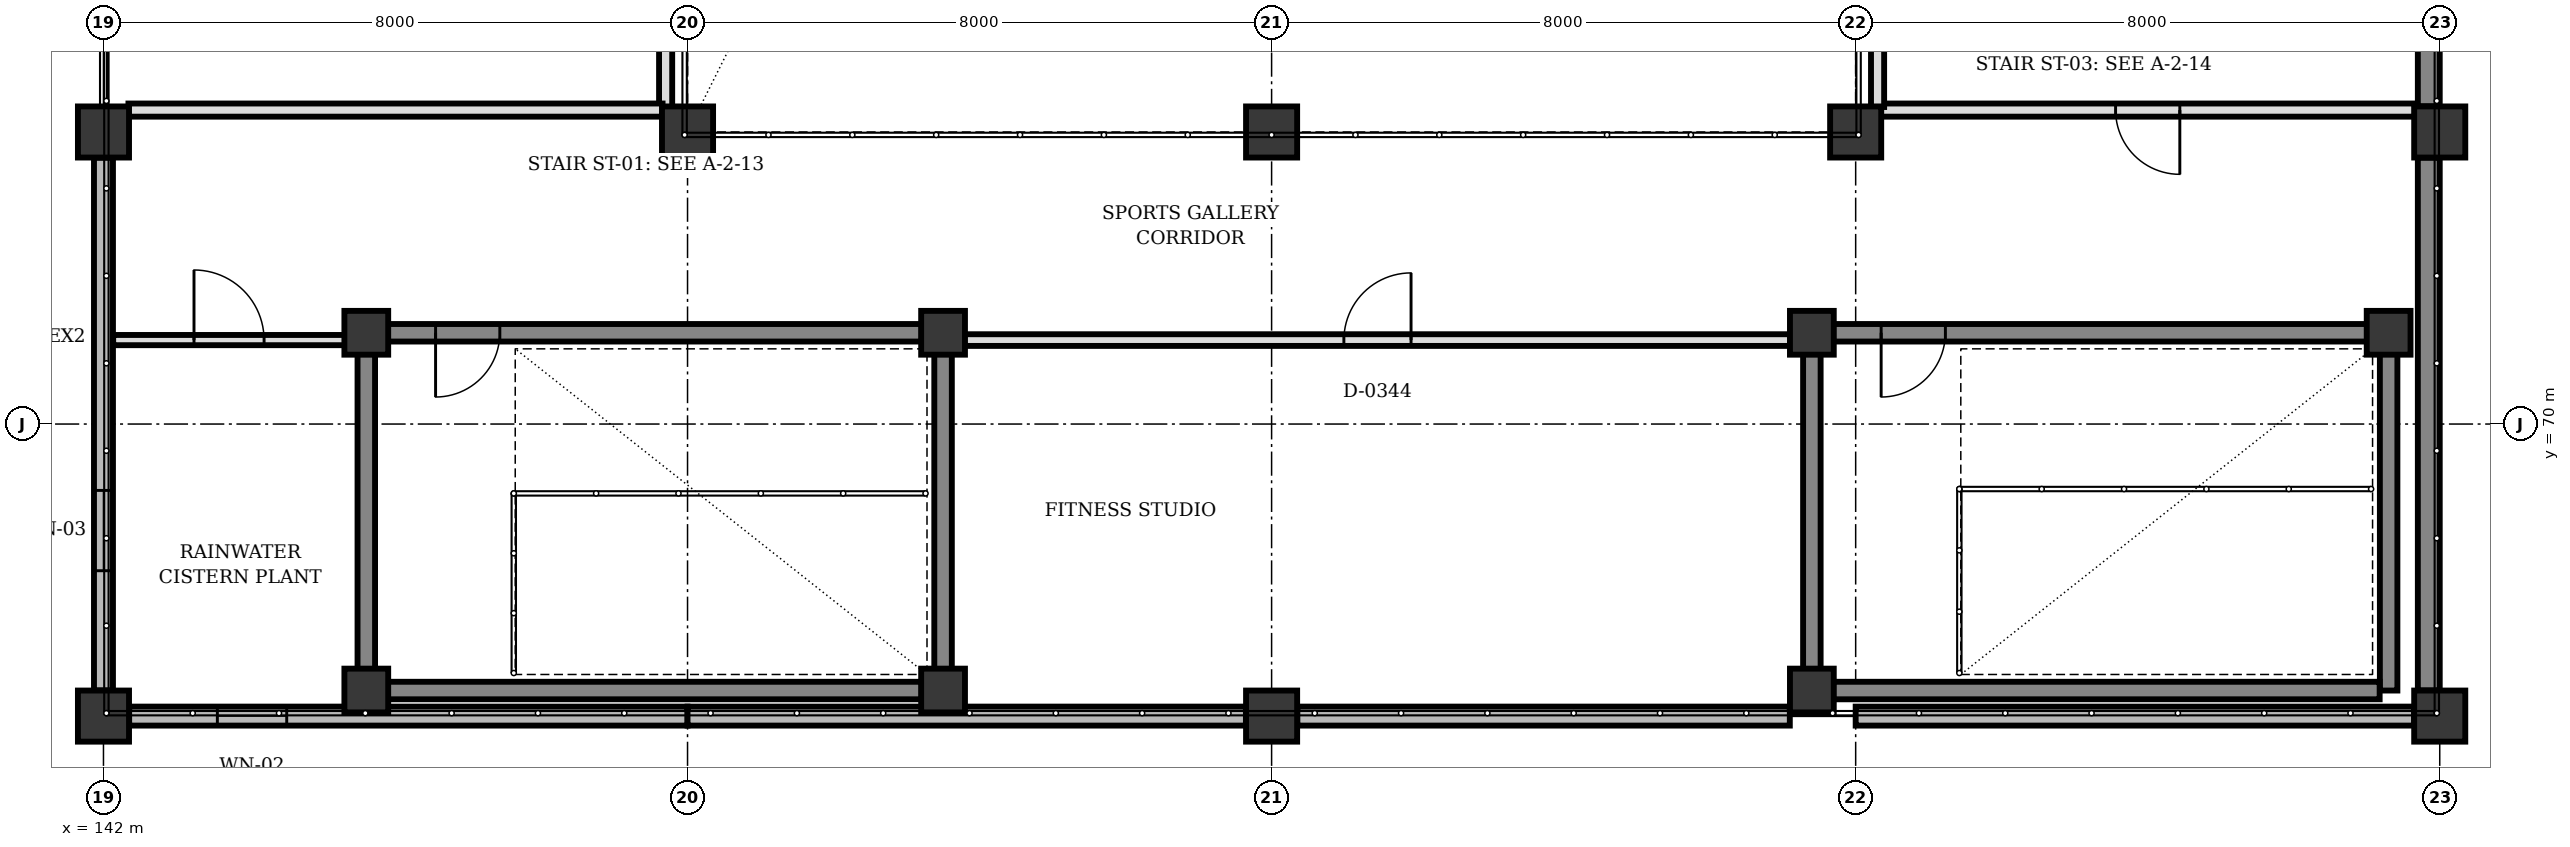
"""IFC4 building model, lengths in metres.
Left out: names, types, materials, properties, quantities, classifications, styles, units other than length and angle.
Written with IfcOpenShell. Run it as: python <this file> out.ifc"""

import sys

from ifc_helpers import new_model, si_unit, direction, frame, frame_2d, origin, origin_2d, place, context, subcontext, project, spatial, rectangle, extrude, element, fill, save


model = new_model("IFC4")
c1 = context("Model", 3, precision=1e-05, world=origin(), true_north=direction((0.0, 1.0)))
c2 = subcontext(c1, "Body", "Model", "MODEL_VIEW")
j1 = project(units=[si_unit("LENGTHUNIT", "METRE"), si_unit("PLANEANGLEUNIT", "RADIAN")], contexts=[c1])
p1 = place(None, origin())
s1 = spatial("IfcSite", under=j1, at=p1, CompositionType="ELEMENT")
p2 = place(p1, origin())
s2 = spatial("IfcBuilding", under=s1, at=p2, CompositionType="ELEMENT")
p3 = place(p2, frame((0.0, 0.0, 4.5)))
s3 = spatial("IfcBuildingStorey", under=s2, at=p3, CompositionType="ELEMENT", Elevation=4.5)
for number, where, z_axis, x_axis in (
    (1, (145.6, 66.35, 0.0), (0.0, 0.0, 1.0), (1.0, 0.0, 0.0)),
    (2, (153.5, 66.35, 0.0), (0.0, 0.0, 1.0), (1.0, 0.0, 0.0)),
    (3, (153.5, 71.25, 0.0), (0.0, 0.0, 1.0), (1.0, 0.0, 0.0)),
    (4, (145.6, 71.25, 0.0), (0.0, 0.0, 1.0), (1.0, 0.0, 0.0)),
    (5, (165.4, 66.35, 0.0), (0.0, 0.0, 1.0), (1.0, 0.0, 0.0)),
    (6, (173.3, 71.25, 0.0), (0.0, 0.0, 1.0), (1.0, 0.0, 0.0)),
    (7, (165.4, 71.25, 0.0), (0.0, 0.0, 1.0), (1.0, 0.0, 0.0)),
):
    element("IfcColumn", number, at=place(p3, frame(where, z_axis=z_axis, x_axis=x_axis)), inside=s3, PredefinedType="COLUMN", context=c2, shape_type="SweptSolid", body=[
        extrude(rectangle(XDim=0.6, YDim=0.6, at=origin_2d()), origin(), (0.0, 0.0, 1.0), 4.0),
    ])
p4 = place(p3, frame((142.0, 66.0, 0.0), z_axis=(0.0, 0.0, 1.0), x_axis=(1.0, 0.0, 0.0)))
e8 = element("IfcColumn", 8, at=p4, inside=s3, PredefinedType="COLUMN", context=c2, shape_type="SweptSolid", body=[
    extrude(rectangle(XDim=0.7, YDim=0.7, at=origin_2d()), origin(), (0.0, 0.0, 1.0), 4.05),
])
for number, where, z_axis, x_axis in (
    (9, (142.0, 74.0, 0.0), (0.0, 0.0, 1.0), (1.0, 0.0, 0.0)),
    (10, (150.0, 74.0, 0.0), (0.0, 0.0, 1.0), (1.0, 0.0, 0.0)),
):
    element("IfcColumn", number, at=place(p3, frame(where, z_axis=z_axis, x_axis=x_axis)), inside=s3, PredefinedType="COLUMN", context=c2, shape_type="SweptSolid", body=[
        extrude(rectangle(XDim=0.7, YDim=0.7, at=origin_2d()), origin(), (0.0, 0.0, 1.0), 5.05),
    ])
p5 = place(p3, frame((158.0, 66.0, 0.0), z_axis=(0.0, 0.0, 1.0), x_axis=(1.0, 0.0, 0.0)))
e11 = element("IfcColumn", 11, at=p5, inside=s3, PredefinedType="COLUMN", context=c2, shape_type="SweptSolid", body=[
    extrude(rectangle(XDim=0.7, YDim=0.7, at=origin_2d()), origin(), (0.0, 0.0, 1.0), 4.05),
])
for number, where, z_axis, x_axis in (
    (12, (158.0, 74.0, 0.0), (0.0, 0.0, 1.0), (1.0, 0.0, 0.0)),
    (13, (166.0, 74.0, 0.0), (0.0, 0.0, 1.0), (1.0, 0.0, 0.0)),
):
    element("IfcColumn", number, at=place(p3, frame(where, z_axis=z_axis, x_axis=x_axis)), inside=s3, PredefinedType="COLUMN", context=c2, shape_type="SweptSolid", body=[
        extrude(rectangle(XDim=0.7, YDim=0.7, at=origin_2d()), origin(), (0.0, 0.0, 1.0), 5.05),
    ])
p6 = place(p3, frame((174.0, 66.0, 0.0), z_axis=(0.0, 0.0, 1.0), x_axis=(1.0, 0.0, 0.0)))
e14 = element("IfcColumn", 14, at=p6, inside=s3, PredefinedType="COLUMN", context=c2, shape_type="SweptSolid", body=[
    extrude(rectangle(XDim=0.7, YDim=0.7, at=origin_2d()), origin(), (0.0, 0.0, 1.0), 4.05),
])
p7 = place(p3, frame((174.0, 74.0, 0.0), z_axis=(0.0, 0.0, 1.0), x_axis=(1.0, 0.0, 0.0)))
e15 = element("IfcColumn", 15, at=p7, inside=s3, PredefinedType="COLUMN", context=c2, shape_type="SweptSolid", body=[
    extrude(rectangle(XDim=0.7, YDim=0.7, at=origin_2d()), origin(), (0.0, 0.0, 1.0), 5.05),
])
for number, where, z_axis, x_axis in (
    (16, (173.85, 81.648, 0.0), (0.0, 0.0, 1.0), (0.0, -1.0, 0.0)),
    (17, (173.85, 73.648, 0.0), (0.0, 0.0, 1.0), (0.0, -1.0, 0.0)),
):
    element("IfcWall", number, at=place(p3, frame(where, z_axis=z_axis, x_axis=x_axis)), inside=s3, PredefinedType="SHEAR", context=c2, shape_type="SweptSolid", body=[
        extrude(rectangle(XDim=7.296, YDim=0.3, at=frame_2d((3.648, 0.0))), origin(), (0.0, 0.0, 1.0), 3.172),
    ])
p8 = place(p3, frame((150.0, 66.0, 0.0), z_axis=(0.0, 0.0, 1.0), x_axis=(-1.0, 0.0, 0.0)))
e18 = element("IfcWall", 18, at=p8, inside=s3, PredefinedType="SOLIDWALL", context=c2, shape_type="SweptSolid", body=[
    extrude(rectangle(XDim=7.648, YDim=0.26, at=frame_2d((3.824, 0.0))), origin(), (0.0, 0.0, 1.0), 3.55),
])
p9 = place(p8, frame((5.49, 0.0, 1.1)))
e19 = element("IfcOpeningElement", 19, at=p9, cuts=e18, PredefinedType="OPENING", context=c2, shape_type="SweptSolid", body=[
    extrude(rectangle(XDim=0.95, YDim=1.1, at=frame_2d((0.475, 0.55))), frame((0.0, 0.14, 0.0), z_axis=(0.0, -1.0, 0.0), x_axis=(1.0, 0.0, 0.0)), (0.0, 0.0, 1.0), 0.28),
])
p10 = place(p3, frame((157.648, 66.0, 0.0), z_axis=(0.0, 0.0, 1.0), x_axis=(-1.0, 0.0, 0.0)))
e20 = element("IfcWall", 20, at=p10, inside=s3, PredefinedType="SOLIDWALL", context=c2, shape_type="SweptSolid", body=[
    extrude(rectangle(XDim=7.648, YDim=0.26, at=frame_2d((3.824, 0.0))), origin(), (0.0, 0.0, 1.0), 3.55),
])
p11 = place(p3, frame((165.098, 66.0, 0.0), z_axis=(0.0, 0.0, 1.0), x_axis=(-1.0, 0.0, 0.0)))
e21 = element("IfcWall", 21, at=p11, inside=s3, PredefinedType="SOLIDWALL", context=c2, shape_type="SweptSolid", body=[
    extrude(rectangle(XDim=6.746, YDim=0.26, at=frame_2d((3.373, 0.0))), origin(), (0.0, 0.0, 1.0), 3.55),
])
p12 = place(p3, frame((173.648, 66.0, 0.0), z_axis=(0.0, 0.0, 1.0), x_axis=(-1.0, 0.0, 0.0)))
e22 = element("IfcWall", 22, at=p12, inside=s3, PredefinedType="SOLIDWALL", context=c2, shape_type="SweptSolid", body=[
    extrude(rectangle(XDim=7.648, YDim=0.26, at=frame_2d((3.824, 0.0))), origin(), (0.0, 0.0, 1.0), 3.55),
])
p13 = place(p3, frame((142.0, 66.352, 0.0), z_axis=(0.0, 0.0, 1.0), x_axis=(0.0, 1.0, 0.0)))
e23 = element("IfcWall", 23, at=p13, inside=s3, PredefinedType="SOLIDWALL", context=c2, shape_type="SweptSolid", body=[
    extrude(rectangle(XDim=7.296, YDim=0.26, at=frame_2d((3.648, 0.0))), origin(), (0.0, 0.0, 1.0), 3.172),
])
p14 = place(p13, frame((1.639, 0.0, 0.9)))
e24 = element("IfcOpeningElement", 24, at=p14, cuts=e23, PredefinedType="OPENING", context=c2, shape_type="SweptSolid", body=[
    extrude(rectangle(XDim=1.1, YDim=1.1, at=frame_2d((0.55, 0.55))), frame((0.0, 0.14, 0.0), z_axis=(0.0, -1.0, 0.0), x_axis=(1.0, 0.0, 0.0)), (0.0, 0.0, 1.0), 0.28),
])
for number, where, z_axis, x_axis in (
    (25, (145.6, 66.642, 0.0), (0.0, 0.0, 1.0), (0.0, 1.0, 0.0)),
    (26, (153.5, 70.958, 0.0), (0.0, 0.0, 1.0), (0.0, -1.0, 0.0)),
):
    element("IfcWall", number, at=place(p3, frame(where, z_axis=z_axis, x_axis=x_axis)), inside=s3, PredefinedType="SHEAR", context=c2, shape_type="SweptSolid", body=[
        extrude(rectangle(XDim=4.316, YDim=0.24, at=frame_2d((2.158, 0.0))), origin(), (0.0, 0.0, 1.0), 3.74),
    ])
p15 = place(p3, frame((153.208, 66.35, 0.0), z_axis=(0.0, 0.0, 1.0), x_axis=(-1.0, 0.0, 0.0)))
e27 = element("IfcWall", 27, at=p15, inside=s3, PredefinedType="SHEAR", context=c2, shape_type="SweptSolid", body=[
    extrude(rectangle(XDim=7.316, YDim=0.24, at=frame_2d((3.658, 0.0))), origin(), (0.0, 0.0, 1.0), 3.74),
])
p16 = place(p3, frame((153.208, 71.25, 0.0), z_axis=(0.0, 0.0, 1.0), x_axis=(-1.0, 0.0, 0.0)))
e28 = element("IfcWall", 28, at=p16, inside=s3, PredefinedType="SHEAR", context=c2, shape_type="SweptSolid", body=[
    extrude(rectangle(XDim=7.316, YDim=0.24, at=frame_2d((3.658, 0.0))), origin(), (0.0, 0.0, 1.0), 3.74),
])
p17 = place(p16, frame((5.779, 0.0, 0.0)))
e29 = element("IfcOpeningElement", 29, at=p17, cuts=e28, PredefinedType="OPENING", context=c2, shape_type="SweptSolid", body=[
    extrude(rectangle(XDim=0.88, YDim=2.1, at=frame_2d((0.44, 1.05))), frame((0.0, 0.13, 0.0), z_axis=(0.0, -1.0, 0.0), x_axis=(1.0, 0.0, 0.0)), (0.0, 0.0, 1.0), 0.26),
])
p18 = place(p3, frame((165.4, 66.642, 0.0), z_axis=(0.0, 0.0, 1.0), x_axis=(0.0, 1.0, 0.0)))
e30 = element("IfcWall", 30, at=p18, inside=s3, PredefinedType="SHEAR", context=c2, shape_type="SweptSolid", body=[
    extrude(rectangle(XDim=4.316, YDim=0.24, at=frame_2d((2.158, 0.0))), origin(), (0.0, 0.0, 1.0), 3.74),
])
p19 = place(p3, frame((173.3, 70.958, 0.0), z_axis=(0.0, 0.0, 1.0), x_axis=(0.0, -1.0, 0.0)))
e31 = element("IfcWall", 31, at=p19, inside=s3, PredefinedType="SHEAR", context=c2, shape_type="SweptSolid", body=[
    extrude(rectangle(XDim=4.608, YDim=0.24, at=frame_2d((2.304, 0.0))), origin(), (0.0, 0.0, 1.0), 3.74),
])
p20 = place(p3, frame((173.177, 66.35, 0.0), z_axis=(0.0, 0.0, 1.0), x_axis=(-1.0, 0.0, 0.0)))
e32 = element("IfcWall", 32, at=p20, inside=s3, PredefinedType="SHEAR", context=c2, shape_type="SweptSolid", body=[
    extrude(rectangle(XDim=7.485, YDim=0.24, at=frame_2d((3.743, 0.0))), origin(), (0.0, 0.0, 1.0), 3.74),
])
p21 = place(p3, frame((173.008, 71.25, 0.0), z_axis=(0.0, 0.0, 1.0), x_axis=(-1.0, 0.0, 0.0)))
e33 = element("IfcWall", 33, at=p21, inside=s3, PredefinedType="SHEAR", context=c2, shape_type="SweptSolid", body=[
    extrude(rectangle(XDim=7.316, YDim=0.24, at=frame_2d((3.658, 0.0))), origin(), (0.0, 0.0, 1.0), 3.74),
])
p22 = place(p21, frame((5.779, 0.0, 0.0)))
e34 = element("IfcOpeningElement", 34, at=p22, cuts=e33, PredefinedType="OPENING", context=c2, shape_type="SweptSolid", body=[
    extrude(rectangle(XDim=0.88, YDim=2.1, at=frame_2d((0.44, 1.05))), frame((0.0, 0.13, 0.0), z_axis=(0.0, -1.0, 0.0), x_axis=(1.0, 0.0, 0.0)), (0.0, 0.0, 1.0), 0.26),
])
p23 = place(p3, frame((173.658, 74.3, 0.0), z_axis=(0.0, 0.0, 1.0), x_axis=(-1.0, 0.0, 0.0)))
e35 = element("IfcWall", 35, at=p23, inside=s3, PredefinedType="PARTITIONING", context=c2, shape_type="SweptSolid", body=[
    extrude(rectangle(XDim=7.316, YDim=0.18, at=frame_2d((3.658, 0.0))), origin(), (0.0, 0.0, 1.0), 3.7),
])
p24 = place(p23, frame((3.218, 0.0, 0.0)))
e36 = element("IfcOpeningElement", 36, at=p24, cuts=e35, PredefinedType="OPENING", context=c2, shape_type="SweptSolid", body=[
    extrude(rectangle(XDim=0.88, YDim=2.1, at=frame_2d((0.44, 1.05))), frame((0.0, 0.1, 0.0), z_axis=(0.0, -1.0, 0.0), x_axis=(1.0, 0.0, 0.0)), (0.0, 0.0, 1.0), 0.2),
])
for number, where, z_axis, x_axis in (
    (37, (166.3, 74.342, 0.0), (0.0, 0.0, 1.0), (0.0, 1.0, 0.0)),
    (38, (149.7, 106.54, 0.0), (0.0, 0.0, 1.0), (0.0, -1.0, 0.0)),
):
    element("IfcWall", number, at=place(p3, frame(where, z_axis=z_axis, x_axis=x_axis)), inside=s3, PredefinedType="PARTITIONING", context=c2, shape_type="SweptSolid", body=[
        extrude(rectangle(XDim=32.198, YDim=0.18, at=frame_2d((16.099, 0.0))), origin(), (0.0, 0.0, 1.0), 3.7),
    ])
p25 = place(p3, frame((149.658, 74.3, 0.0), z_axis=(0.0, 0.0, 1.0), x_axis=(-1.0, 0.0, 0.0)))
e39 = element("IfcWall", 39, at=p25, inside=s3, PredefinedType="PARTITIONING", context=c2, shape_type="SweptSolid", body=[
    extrude(rectangle(XDim=7.316, YDim=0.18, at=frame_2d((3.658, 0.0))), origin(), (0.0, 0.0, 1.0), 3.7),
])
p26 = place(p3, frame((153.792, 71.15, 0.0), z_axis=(0.0, 0.0, 1.0), x_axis=(1.0, 0.0, 0.0)))
e40 = element("IfcWall", 40, at=p26, inside=s3, PredefinedType="PARTITIONING", context=c2, shape_type="SweptSolid", body=[
    extrude(rectangle(XDim=11.316, YDim=0.16, at=frame_2d((5.658, 0.0))), origin(), (0.0, 0.0, 1.0), 3.172),
])
p27 = place(p26, frame((5.198, 0.0, 0.0)))
e41 = element("IfcOpeningElement", 41, at=p27, cuts=e40, PredefinedType="OPENING", context=c2, shape_type="SweptSolid", body=[
    extrude(rectangle(XDim=0.92, YDim=2.1, at=frame_2d((0.46, 1.05))), frame((0.0, 0.09, 0.0), z_axis=(0.0, -1.0, 0.0), x_axis=(1.0, 0.0, 0.0)), (0.0, 0.0, 1.0), 0.18),
])
p28 = place(p3, frame((142.133, 71.15, 0.0), z_axis=(0.0, 0.0, 1.0), x_axis=(1.0, 0.0, 0.0)))
e42 = element("IfcWall", 42, at=p28, inside=s3, PredefinedType="PARTITIONING", context=c2, shape_type="SweptSolid", body=[
    extrude(rectangle(XDim=3.175, YDim=0.14, at=frame_2d((1.587, 0.0))), origin(), (0.0, 0.0, 1.0), 3.172),
])
p29 = place(p28, frame((1.107, 0.0, 0.0)))
e43 = element("IfcOpeningElement", 43, at=p29, cuts=e42, PredefinedType="OPENING", context=c2, shape_type="SweptSolid", body=[
    extrude(rectangle(XDim=0.96, YDim=2.1, at=frame_2d((0.48, 1.05))), frame((0.0, 0.08, 0.0), z_axis=(0.0, -1.0, 0.0), x_axis=(1.0, 0.0, 0.0)), (0.0, 0.0, 1.0), 0.16),
])
p30 = place(p9, origin())
e44 = element("IfcWindow", 44, at=p30, inside=s3, PartitioningType="SINGLE_PANEL", PredefinedType="WINDOW", context=c2, shape_type="SweptSolid", body=[
    extrude(rectangle(XDim=0.95, YDim=1.1, at=frame_2d((0.475, 0.55))), frame((0.0, 0.03, 0.0), z_axis=(0.0, -1.0, 0.0), x_axis=(1.0, 0.0, 0.0)), (0.0, 0.0, 1.0), 0.06),
])
fill(e19, e44)
p31 = place(p14, origin())
e45 = element("IfcWindow", 45, at=p31, inside=s3, PartitioningType="SINGLE_PANEL", PredefinedType="WINDOW", context=c2, shape_type="SweptSolid", body=[
    extrude(rectangle(XDim=1.1, YDim=1.1, at=frame_2d((0.55, 0.55))), frame((0.0, 0.03, 0.0), z_axis=(0.0, -1.0, 0.0), x_axis=(1.0, 0.0, 0.0)), (0.0, 0.0, 1.0), 0.06),
])
fill(e24, e45)
p32 = place(p17, origin())
e46 = element("IfcDoor", 46, at=p32, inside=s3, OperationType="SINGLE_SWING_RIGHT", PredefinedType="DOOR", context=c2, shape_type="SweptSolid", body=[
    extrude(rectangle(XDim=0.88, YDim=2.1, at=frame_2d((0.44, 1.05))), frame((0.0, 0.025, 0.0), z_axis=(0.0, -1.0, 0.0), x_axis=(1.0, 0.0, 0.0)), (0.0, 0.0, 1.0), 0.05),
])
fill(e29, e46)
p33 = place(p22, origin())
e47 = element("IfcDoor", 47, at=p33, inside=s3, OperationType="SINGLE_SWING_RIGHT", PredefinedType="DOOR", context=c2, shape_type="SweptSolid", body=[
    extrude(rectangle(XDim=0.88, YDim=2.1, at=frame_2d((0.44, 1.05))), frame((0.0, 0.025, 0.0), z_axis=(0.0, -1.0, 0.0), x_axis=(1.0, 0.0, 0.0)), (0.0, 0.0, 1.0), 0.05),
])
fill(e34, e47)
p34 = place(p24, origin())
e48 = element("IfcDoor", 48, at=p34, inside=s3, OperationType="SINGLE_SWING_LEFT", PredefinedType="DOOR", context=c2, shape_type="SweptSolid", body=[
    extrude(rectangle(XDim=0.88, YDim=2.1, at=frame_2d((0.44, 1.05))), frame((0.0, 0.025, 0.0), z_axis=(0.0, -1.0, 0.0), x_axis=(1.0, 0.0, 0.0)), (0.0, 0.0, 1.0), 0.05),
])
fill(e36, e48)
p35 = place(p27, origin())
e49 = element("IfcDoor", 49, at=p35, inside=s3, OperationType="SINGLE_SWING_RIGHT", PredefinedType="DOOR", context=c2, shape_type="SweptSolid", body=[
    extrude(rectangle(XDim=0.92, YDim=2.1, at=frame_2d((0.46, 1.05))), frame((0.0, 0.025, 0.0), z_axis=(0.0, -1.0, 0.0), x_axis=(1.0, 0.0, 0.0)), (0.0, 0.0, 1.0), 0.05),
])
fill(e41, e49)
p36 = place(p29, origin())
e50 = element("IfcDoor", 50, at=p36, inside=s3, OperationType="SINGLE_SWING_LEFT", PredefinedType="DOOR", context=c2, shape_type="SweptSolid", body=[
    extrude(rectangle(XDim=0.96, YDim=2.1, at=frame_2d((0.48, 1.05))), frame((0.0, 0.025, 0.0), z_axis=(0.0, -1.0, 0.0), x_axis=(1.0, 0.0, 0.0)), (0.0, 0.0, 1.0), 0.05),
])
fill(e43, e50)
save(model, sys.argv[1])
